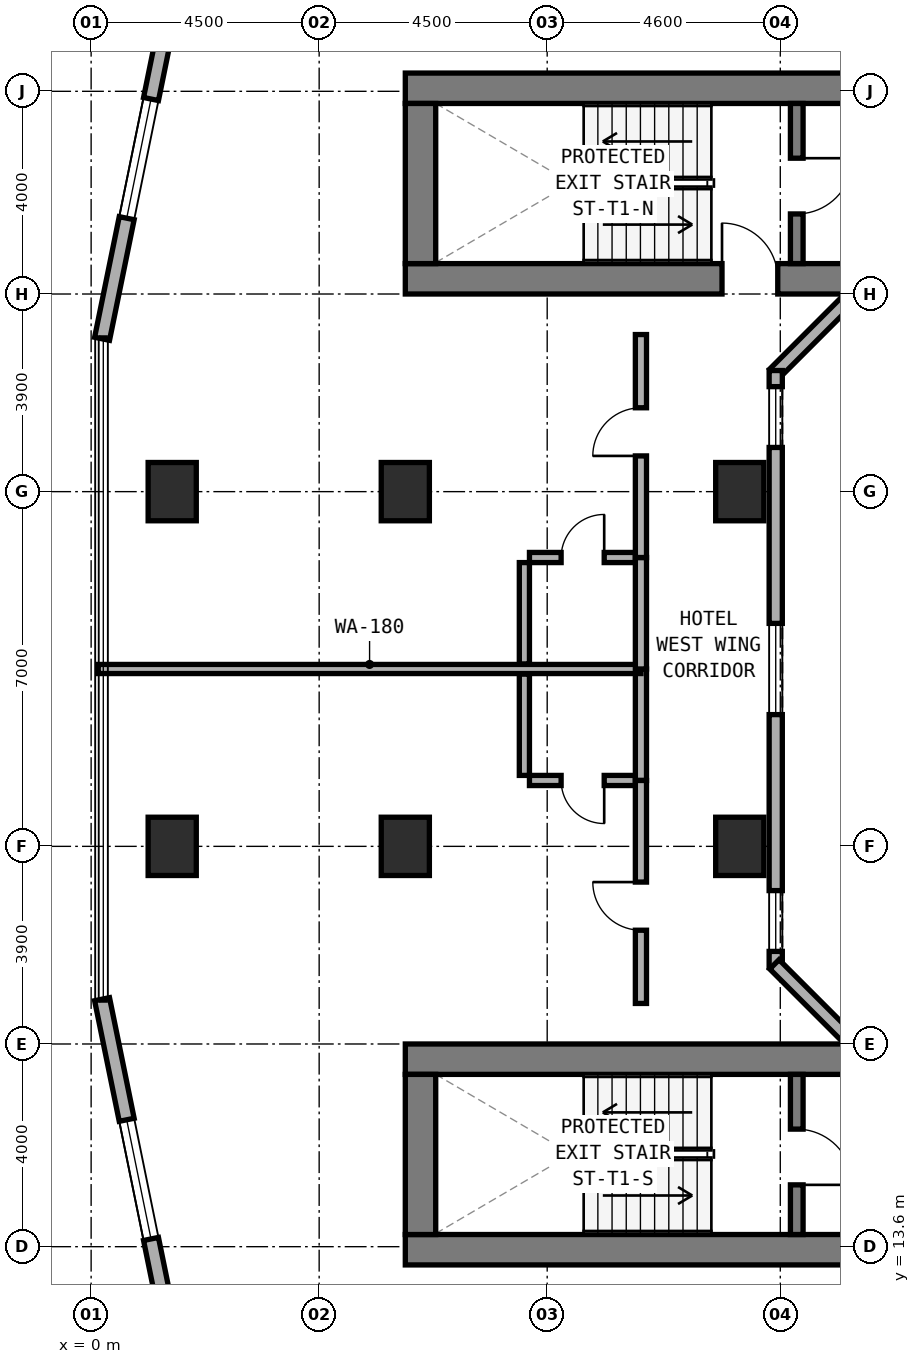
"""IFC4 building model, lengths in metres.
Left out: names, types, materials, properties, quantities, classifications, styles, units other than length and angle.
Written with IfcOpenShell. Run it as: python <this file> out.ifc"""

import sys

from ifc_helpers import new_model, si_unit, direction, frame, frame_2d, origin, origin_2d, place, context, subcontext, project, spatial, rectangle, extrude, element, fill, save


model = new_model("IFC4")
c1 = context("Model", 3, precision=1e-05, world=origin(), true_north=direction((0.0, 1.0)))
c2 = subcontext(c1, "Body", "Model", "MODEL_VIEW")
j1 = project(units=[si_unit("LENGTHUNIT", "METRE"), si_unit("PLANEANGLEUNIT", "RADIAN")], contexts=[c1])
p1 = place(None, origin())
s1 = spatial("IfcSite", under=j1, at=p1, CompositionType="ELEMENT")
p2 = place(p1, origin())
s2 = spatial("IfcBuilding", under=s1, at=p2, CompositionType="ELEMENT")
p3 = place(p2, frame((0.0, 0.0, 31.0)))
s3 = spatial("IfcBuildingStorey", under=s2, at=p3, CompositionType="ELEMENT", Elevation=31.0)
p4 = place(p3, frame((6.2, 32.7, 0.0), z_axis=(0.0, 0.0, 1.0), x_axis=(1.0, 0.0, 0.0)))
e1 = element("IfcWall", 1, at=p4, inside=s3, PredefinedType="SHEAR", context=c2, shape_type="SweptSolid", body=[
    extrude(rectangle(XDim=24.8, YDim=0.6, at=frame_2d((12.4, 0.0))), origin(), (0.0, 0.0, 1.0), 3.5),
])
p5 = place(p4, frame((6.25, 0.0, 0.0)))
e2 = element("IfcOpeningElement", 2, at=p5, cuts=e1, PredefinedType="OPENING", context=c2, shape_type="SweptSolid", body=[
    extrude(rectangle(XDim=1.1, YDim=2.15, at=frame_2d((0.55, 1.075))), frame((0.0, 0.31, 0.0), z_axis=(0.0, -1.0, 0.0), x_axis=(1.0, 0.0, 0.0)), (0.0, 0.0, 1.0), 0.62),
])
p6 = place(p3, frame((6.2, 36.46, 0.0), z_axis=(0.0, 0.0, 1.0), x_axis=(1.0, 0.0, 0.0)))
e3 = element("IfcWall", 3, at=p6, inside=s3, PredefinedType="SHEAR", context=c2, shape_type="SweptSolid", body=[
    extrude(rectangle(XDim=24.8, YDim=0.6, at=frame_2d((12.4, 0.0))), origin(), (0.0, 0.0, 1.0), 3.5),
])
p7 = place(p6, frame((9.35, 0.0, 0.0)))
e4 = element("IfcOpeningElement", 4, at=p7, cuts=e3, PredefinedType="OPENING", context=c2, shape_type="SweptSolid", body=[
    extrude(rectangle(XDim=1.2, YDim=2.15, at=frame_2d((0.6, 1.075))), frame((0.0, 0.31, 0.0), z_axis=(0.0, -1.0, 0.0), x_axis=(1.0, 0.0, 0.0)), (0.0, 0.0, 1.0), 0.62),
])
p8 = place(p6, frame((17.14, 0.0, 0.0)))
e5 = element("IfcOpeningElement", 5, at=p8, cuts=e3, PredefinedType="OPENING", context=c2, shape_type="SweptSolid", body=[
    extrude(rectangle(XDim=0.85, YDim=2.1, at=frame_2d((0.425, 1.05))), frame((0.0, 0.31, 0.0), z_axis=(0.0, -1.0, 0.0), x_axis=(1.0, 0.0, 0.0)), (0.0, 0.0, 1.0), 0.62),
])
p9 = place(p6, frame((18.983, 0.0, 0.0)))
e6 = element("IfcOpeningElement", 6, at=p9, cuts=e3, PredefinedType="OPENING", context=c2, shape_type="SweptSolid", body=[
    extrude(rectangle(XDim=1.1, YDim=2.15, at=frame_2d((0.55, 1.075))), frame((0.0, 0.31, 0.0), z_axis=(0.0, -1.0, 0.0), x_axis=(1.0, 0.0, 0.0)), (0.0, 0.0, 1.0), 0.62),
])
p10 = place(p6, frame((20.85, 0.0, 0.0)))
e7 = element("IfcOpeningElement", 7, at=p10, cuts=e3, PredefinedType="OPENING", context=c2, shape_type="SweptSolid", body=[
    extrude(rectangle(XDim=1.1, YDim=2.15, at=frame_2d((0.55, 1.075))), frame((0.0, 0.31, 0.0), z_axis=(0.0, -1.0, 0.0), x_axis=(1.0, 0.0, 0.0)), (0.0, 0.0, 1.0), 0.62),
])
p11 = place(p6, frame((22.716, 0.0, 0.0)))
e8 = element("IfcOpeningElement", 8, at=p11, cuts=e3, PredefinedType="OPENING", context=c2, shape_type="SweptSolid", body=[
    extrude(rectangle(XDim=1.1, YDim=2.15, at=frame_2d((0.55, 1.075))), frame((0.0, 0.31, 0.0), z_axis=(0.0, -1.0, 0.0), x_axis=(1.0, 0.0, 0.0)), (0.0, 0.0, 1.0), 0.62),
])
p12 = place(p3, frame((6.5, 33.0, 0.0), z_axis=(0.0, 0.0, 1.0), x_axis=(0.0, 1.0, 0.0)))
e9 = element("IfcWall", 9, at=p12, inside=s3, PredefinedType="SHEAR", context=c2, shape_type="SweptSolid", body=[
    extrude(rectangle(XDim=3.16, YDim=0.6, at=frame_2d((1.58, 0.0))), origin(), (0.0, 0.0, 1.0), 3.5),
])
p13 = place(p3, frame((13.925, 33.0, 0.0), z_axis=(0.0, 0.0, 1.0), x_axis=(0.0, 1.0, 0.0)))
e10 = element("IfcWall", 10, at=p13, inside=s3, PredefinedType="STANDARD", context=c2, shape_type="SweptSolid", body=[
    extrude(rectangle(XDim=3.16, YDim=0.25, at=frame_2d((1.58, 0.0))), origin(), (0.0, 0.0, 1.0), 3.22),
])
p14 = place(p13, frame((0.98, 0.0, 0.0)))
e11 = element("IfcOpeningElement", 11, at=p14, cuts=e10, PredefinedType="OPENING", context=c2, shape_type="SweptSolid", body=[
    extrude(rectangle(XDim=1.1, YDim=2.15, at=frame_2d((0.55, 1.075))), frame((0.0, 0.135, 0.0), z_axis=(0.0, -1.0, 0.0), x_axis=(1.0, 0.0, 0.0)), (0.0, 0.0, 1.0), 0.27),
])
p15 = place(p3, frame((6.2, 13.54, 0.0), z_axis=(0.0, 0.0, 1.0), x_axis=(1.0, 0.0, 0.0)))
e12 = element("IfcWall", 12, at=p15, inside=s3, PredefinedType="SHEAR", context=c2, shape_type="SweptSolid", body=[
    extrude(rectangle(XDim=24.8, YDim=0.6, at=frame_2d((12.4, 0.0))), origin(), (0.0, 0.0, 1.0), 3.5),
])
p16 = place(p15, frame((9.35, 0.0, 0.0)))
e13 = element("IfcOpeningElement", 13, at=p16, cuts=e12, PredefinedType="OPENING", context=c2, shape_type="SweptSolid", body=[
    extrude(rectangle(XDim=1.2, YDim=2.15, at=frame_2d((0.6, 1.075))), frame((0.0, 0.31, 0.0), z_axis=(0.0, -1.0, 0.0), x_axis=(1.0, 0.0, 0.0)), (0.0, 0.0, 1.0), 0.62),
])
p17 = place(p15, frame((17.14, 0.0, 0.0)))
e14 = element("IfcOpeningElement", 14, at=p17, cuts=e12, PredefinedType="OPENING", context=c2, shape_type="SweptSolid", body=[
    extrude(rectangle(XDim=0.85, YDim=2.1, at=frame_2d((0.425, 1.05))), frame((0.0, 0.31, 0.0), z_axis=(0.0, -1.0, 0.0), x_axis=(1.0, 0.0, 0.0)), (0.0, 0.0, 1.0), 0.62),
])
p18 = place(p3, frame((6.2, 17.3, 0.0), z_axis=(0.0, 0.0, 1.0), x_axis=(1.0, 0.0, 0.0)))
e15 = element("IfcWall", 15, at=p18, inside=s3, PredefinedType="SHEAR", context=c2, shape_type="SweptSolid", body=[
    extrude(rectangle(XDim=24.8, YDim=0.6, at=frame_2d((12.4, 0.0))), origin(), (0.0, 0.0, 1.0), 3.5),
])
p19 = place(p3, frame((6.5, 13.84, 0.0), z_axis=(0.0, 0.0, 1.0), x_axis=(0.0, 1.0, 0.0)))
e16 = element("IfcWall", 16, at=p19, inside=s3, PredefinedType="SHEAR", context=c2, shape_type="SweptSolid", body=[
    extrude(rectangle(XDim=3.16, YDim=0.6, at=frame_2d((1.58, 0.0))), origin(), (0.0, 0.0, 1.0), 3.5),
])
p20 = place(p3, frame((13.925, 13.84, 0.0), z_axis=(0.0, 0.0, 1.0), x_axis=(0.0, 1.0, 0.0)))
e17 = element("IfcWall", 17, at=p20, inside=s3, PredefinedType="STANDARD", context=c2, shape_type="SweptSolid", body=[
    extrude(rectangle(XDim=3.16, YDim=0.25, at=frame_2d((1.58, 0.0))), origin(), (0.0, 0.0, 1.0), 3.22),
])
p21 = place(p20, frame((0.98, 0.0, 0.0)))
e18 = element("IfcOpeningElement", 18, at=p21, cuts=e17, PredefinedType="OPENING", context=c2, shape_type="SweptSolid", body=[
    extrude(rectangle(XDim=1.1, YDim=2.15, at=frame_2d((0.55, 1.075))), frame((0.0, 0.135, 0.0), z_axis=(0.0, -1.0, 0.0), x_axis=(1.0, 0.0, 0.0)), (0.0, 0.0, 1.0), 0.27),
])
for number, where, z_axis, x_axis in (
    (19, (6.2, 21.5, 0.0), (0.0, 0.0, 1.0), (1.0, 0.0, 0.0)),
    (20, (6.2, 28.5, 0.0), (0.0, 0.0, 1.0), (1.0, 0.0, 0.0)),
    (21, (12.8, 21.5, 0.0), (0.0, 0.0, 1.0), (1.0, 0.0, 0.0)),
    (22, (12.8, 28.5, 0.0), (0.0, 0.0, 1.0), (1.0, 0.0, 0.0)),
    (23, (1.6, 21.5, 0.0), (0.0, 0.0, 1.0), (1.0, 0.0, 0.0)),
    (24, (1.6, 28.5, 0.0), (0.0, 0.0, 1.0), (1.0, 0.0, 0.0)),
):
    element("IfcColumn", number, at=place(p3, frame(where, z_axis=z_axis, x_axis=x_axis)), inside=s3, PredefinedType="COLUMN", context=c2, shape_type="SweptSolid", body=[
        extrude(rectangle(XDim=0.95, YDim=1.15, at=origin_2d()), origin(), (0.0, 0.0, 1.0), 3.5),
    ])
p22 = place(p3, frame((2.229, 41.378, 0.0), z_axis=(0.0, 0.0, 1.0), x_axis=(-0.199990901713, -0.979797754249, 0.0)))
e25 = element("IfcWall", 25, at=p22, inside=s3, PredefinedType="STANDARD", context=c2, shape_type="SweptSolid", body=[
    extrude(rectangle(XDim=10.065, YDim=0.3, at=frame_2d((5.033, 0.0))), origin(), (0.0, 0.0, 1.0), 3.22),
])
p23 = place(p22, frame((0.378, 0.0, 0.85)))
e26 = element("IfcOpeningElement", 26, at=p23, cuts=e25, PredefinedType="OPENING", context=c2, shape_type="SweptSolid", body=[
    extrude(rectangle(XDim=1.8, YDim=1.5, at=frame_2d((0.9, 0.75))), frame((0.0, 0.16, 0.0), z_axis=(0.0, -1.0, 0.0), x_axis=(1.0, 0.0, 0.0)), (0.0, 0.0, 1.0), 0.32),
])
p24 = place(p22, frame((5.236, 0.0, 0.8)))
e27 = element("IfcOpeningElement", 27, at=p24, cuts=e25, PredefinedType="OPENING", context=c2, shape_type="SweptSolid", body=[
    extrude(rectangle(XDim=2.4, YDim=1.6, at=frame_2d((1.2, 0.8))), frame((0.0, 0.16, 0.0), z_axis=(0.0, -1.0, 0.0), x_axis=(1.0, 0.0, 0.0)), (0.0, 0.0, 1.0), 0.32),
])
p25 = place(p3, frame((0.216, 18.484, 0.0), z_axis=(0.0, 0.0, 1.0), x_axis=(0.199990901713, -0.979797754249, 0.0)))
e28 = element("IfcWall", 28, at=p25, inside=s3, PredefinedType="STANDARD", context=c2, shape_type="SweptSolid", body=[
    extrude(rectangle(XDim=10.065, YDim=0.3, at=frame_2d((5.033, 0.0))), origin(), (0.0, 0.0, 1.0), 3.22),
])
p26 = place(p25, frame((2.429, 0.0, 0.8)))
e29 = element("IfcOpeningElement", 29, at=p26, cuts=e28, PredefinedType="OPENING", context=c2, shape_type="SweptSolid", body=[
    extrude(rectangle(XDim=2.4, YDim=1.6, at=frame_2d((1.2, 0.8))), frame((0.0, 0.16, 0.0), z_axis=(0.0, -1.0, 0.0), x_axis=(1.0, 0.0, 0.0)), (0.0, 0.0, 1.0), 0.32),
])
p27 = place(p25, frame((7.887, 0.0, 0.85)))
e30 = element("IfcOpeningElement", 30, at=p27, cuts=e28, PredefinedType="OPENING", context=c2, shape_type="SweptSolid", body=[
    extrude(rectangle(XDim=1.8, YDim=1.5, at=frame_2d((0.9, 0.75))), frame((0.0, 0.16, 0.0), z_axis=(0.0, -1.0, 0.0), x_axis=(1.0, 0.0, 0.0)), (0.0, 0.0, 1.0), 0.32),
])
p28 = place(p3, frame((15.318, 32.662, 0.0), z_axis=(0.0, 0.0, 1.0), x_axis=(-0.707106781187, -0.707106781187, 0.0)))
e31 = element("IfcWall", 31, at=p28, inside=s3, PredefinedType="STANDARD", context=c2, shape_type="SweptSolid", body=[
    extrude(rectangle(XDim=2.594, YDim=0.26, at=frame_2d((1.297, 0.0))), origin(), (0.0, 0.0, 1.0), 3.22),
])
p29 = place(p3, frame((13.51, 30.89, 0.0), z_axis=(0.0, 0.0, 1.0), x_axis=(0.0, -1.0, 0.0)))
e32 = element("IfcWall", 32, at=p29, inside=s3, PredefinedType="STANDARD", context=c2, shape_type="SweptSolid", body=[
    extrude(rectangle(XDim=11.78, YDim=0.26, at=frame_2d((5.89, 0.0))), origin(), (0.0, 0.0, 1.0), 3.22),
])
p30 = place(p29, frame((0.318, 0.0, 0.85)))
e33 = element("IfcOpeningElement", 33, at=p30, cuts=e32, PredefinedType="OPENING", context=c2, shape_type="SweptSolid", body=[
    extrude(rectangle(XDim=1.2, YDim=1.5, at=frame_2d((0.6, 0.75))), frame((0.0, 0.14, 0.0), z_axis=(0.0, -1.0, 0.0), x_axis=(1.0, 0.0, 0.0)), (0.0, 0.0, 1.0), 0.28),
])
p31 = place(p29, frame((4.99, 0.0, 0.85)))
e34 = element("IfcOpeningElement", 34, at=p31, cuts=e32, PredefinedType="OPENING", context=c2, shape_type="SweptSolid", body=[
    extrude(rectangle(XDim=1.8, YDim=1.5, at=frame_2d((0.9, 0.75))), frame((0.0, 0.14, 0.0), z_axis=(0.0, -1.0, 0.0), x_axis=(1.0, 0.0, 0.0)), (0.0, 0.0, 1.0), 0.28),
])
p32 = place(p29, frame((10.263, 0.0, 0.85)))
e35 = element("IfcOpeningElement", 35, at=p32, cuts=e32, PredefinedType="OPENING", context=c2, shape_type="SweptSolid", body=[
    extrude(rectangle(XDim=1.2, YDim=1.5, at=frame_2d((0.6, 0.75))), frame((0.0, 0.14, 0.0), z_axis=(0.0, -1.0, 0.0), x_axis=(1.0, 0.0, 0.0)), (0.0, 0.0, 1.0), 0.28),
])
p33 = place(p3, frame((13.484, 19.172, 0.0), z_axis=(0.0, 0.0, 1.0), x_axis=(0.707106781187, -0.707106781187, 0.0)))
e36 = element("IfcWall", 36, at=p33, inside=s3, PredefinedType="STANDARD", context=c2, shape_type="SweptSolid", body=[
    extrude(rectangle(XDim=2.594, YDim=0.26, at=frame_2d((1.297, 0.0))), origin(), (0.0, 0.0, 1.0), 3.22),
])
p34 = place(p3, frame((8.65, 22.8, 0.0), z_axis=(0.0, 0.0, 1.0), x_axis=(1.0, 0.0, 0.0)))
e37 = element("IfcWall", 37, at=p34, inside=s3, PredefinedType="PLUMBINGWALL", context=c2, shape_type="SweptSolid", body=[
    extrude(rectangle(XDim=2.1, YDim=0.2, at=frame_2d((1.05, 0.0))), origin(), (0.0, 0.0, 1.0), 3.22),
])
p35 = place(p34, frame((0.625, 0.0, 0.0)))
e38 = element("IfcOpeningElement", 38, at=p35, cuts=e37, PredefinedType="OPENING", context=c2, shape_type="SweptSolid", body=[
    extrude(rectangle(XDim=0.85, YDim=2.1, at=frame_2d((0.425, 1.05))), frame((0.0, 0.11, 0.0), z_axis=(0.0, -1.0, 0.0), x_axis=(1.0, 0.0, 0.0)), (0.0, 0.0, 1.0), 0.22),
])
p36 = place(p3, frame((8.55, 22.9, 0.0), z_axis=(0.0, 0.0, 1.0), x_axis=(0.0, 1.0, 0.0)))
e39 = element("IfcWall", 39, at=p36, inside=s3, PredefinedType="PLUMBINGWALL", context=c2, shape_type="SweptSolid", body=[
    extrude(rectangle(XDim=2.0, YDim=0.2, at=frame_2d((1.0, 0.0))), origin(), (0.0, 0.0, 1.0), 3.22),
])
p37 = place(p3, frame((10.85, 22.8, 0.0), z_axis=(0.0, 0.0, 1.0), x_axis=(0.0, 1.0, 0.0)))
e40 = element("IfcWall", 40, at=p37, inside=s3, PredefinedType="SOLIDWALL", context=c2, shape_type="SweptSolid", body=[
    extrude(rectangle(XDim=2.2, YDim=0.22, at=frame_2d((1.1, 0.0))), origin(), (0.0, 0.0, 1.0), 3.22),
])
p38 = place(p3, frame((10.85, 18.4, 0.0), z_axis=(0.0, 0.0, 1.0), x_axis=(0.0, 1.0, 0.0)))
e41 = element("IfcWall", 41, at=p38, inside=s3, PredefinedType="SOLIDWALL", context=c2, shape_type="SweptSolid", body=[
    extrude(rectangle(XDim=4.4, YDim=0.22, at=frame_2d((2.2, 0.0))), origin(), (0.0, 0.0, 1.0), 2.395),
])
p39 = place(p38, frame((1.445, 0.0, 0.0)))
e42 = element("IfcOpeningElement", 42, at=p39, cuts=e41, PredefinedType="OPENING", context=c2, shape_type="SweptSolid", body=[
    extrude(rectangle(XDim=0.95, YDim=2.1, at=frame_2d((0.475, 1.05))), frame((0.0, 0.12, 0.0), z_axis=(0.0, -1.0, 0.0), x_axis=(1.0, 0.0, 0.0)), (0.0, 0.0, 1.0), 0.24),
])
p40 = place(p3, frame((0.14, 25.0, 0.0), z_axis=(0.0, 0.0, 1.0), x_axis=(1.0, 0.0, 0.0)))
e43 = element("IfcWall", 43, at=p40, inside=s3, PredefinedType="SOLIDWALL", context=c2, shape_type="SweptSolid", body=[
    extrude(rectangle(XDim=10.71, YDim=0.18, at=frame_2d((5.355, 0.0))), origin(), (0.0, 0.0, 1.0), 2.745),
])
p41 = place(p3, frame((8.65, 27.2, 0.0), z_axis=(0.0, 0.0, 1.0), x_axis=(1.0, 0.0, 0.0)))
e44 = element("IfcWall", 44, at=p41, inside=s3, PredefinedType="PLUMBINGWALL", context=c2, shape_type="SweptSolid", body=[
    extrude(rectangle(XDim=2.1, YDim=0.2, at=frame_2d((1.05, 0.0))), origin(), (0.0, 0.0, 1.0), 3.22),
])
p42 = place(p41, frame((0.625, 0.0, 0.0)))
e45 = element("IfcOpeningElement", 45, at=p42, cuts=e44, PredefinedType="OPENING", context=c2, shape_type="SweptSolid", body=[
    extrude(rectangle(XDim=0.85, YDim=2.1, at=frame_2d((0.425, 1.05))), frame((0.0, 0.11, 0.0), z_axis=(0.0, -1.0, 0.0), x_axis=(1.0, 0.0, 0.0)), (0.0, 0.0, 1.0), 0.22),
])
p43 = place(p3, frame((8.55, 25.1, 0.0), z_axis=(0.0, 0.0, 1.0), x_axis=(0.0, 1.0, 0.0)))
e46 = element("IfcWall", 46, at=p43, inside=s3, PredefinedType="PLUMBINGWALL", context=c2, shape_type="SweptSolid", body=[
    extrude(rectangle(XDim=2.0, YDim=0.2, at=frame_2d((1.0, 0.0))), origin(), (0.0, 0.0, 1.0), 3.22),
])
p44 = place(p3, frame((10.85, 25.0, 0.0), z_axis=(0.0, 0.0, 1.0), x_axis=(0.0, 1.0, 0.0)))
e47 = element("IfcWall", 47, at=p44, inside=s3, PredefinedType="SOLIDWALL", context=c2, shape_type="SweptSolid", body=[
    extrude(rectangle(XDim=2.2, YDim=0.22, at=frame_2d((1.1, 0.0))), origin(), (0.0, 0.0, 1.0), 3.22),
])
p45 = place(p3, frame((10.85, 27.2, 0.0), z_axis=(0.0, 0.0, 1.0), x_axis=(0.0, 1.0, 0.0)))
e48 = element("IfcWall", 48, at=p45, inside=s3, PredefinedType="SOLIDWALL", context=c2, shape_type="SweptSolid", body=[
    extrude(rectangle(XDim=4.4, YDim=0.22, at=frame_2d((2.2, 0.0))), origin(), (0.0, 0.0, 1.0), 2.395),
])
p46 = place(p45, frame((2.005, 0.0, 0.0)))
e49 = element("IfcOpeningElement", 49, at=p46, cuts=e48, PredefinedType="OPENING", context=c2, shape_type="SweptSolid", body=[
    extrude(rectangle(XDim=0.95, YDim=2.1, at=frame_2d((0.475, 1.05))), frame((0.0, 0.12, 0.0), z_axis=(0.0, -1.0, 0.0), x_axis=(1.0, 0.0, 0.0)), (0.0, 0.0, 1.0), 0.24),
])
p47 = place(p24, origin())
e50 = element("IfcWindow", 50, at=p47, inside=s3, PartitioningType="SINGLE_PANEL", PredefinedType="WINDOW", context=c2, shape_type="SweptSolid", body=[
    extrude(rectangle(XDim=2.4, YDim=1.6, at=frame_2d((1.2, 0.8))), frame((0.0, 0.03, 0.0), z_axis=(0.0, -1.0, 0.0), x_axis=(1.0, 0.0, 0.0)), (0.0, 0.0, 1.0), 0.06),
])
fill(e27, e50)
p48 = place(p26, origin())
e51 = element("IfcWindow", 51, at=p48, inside=s3, PartitioningType="SINGLE_PANEL", PredefinedType="WINDOW", context=c2, shape_type="SweptSolid", body=[
    extrude(rectangle(XDim=2.4, YDim=1.6, at=frame_2d((1.2, 0.8))), frame((0.0, 0.03, 0.0), z_axis=(0.0, -1.0, 0.0), x_axis=(1.0, 0.0, 0.0)), (0.0, 0.0, 1.0), 0.06),
])
fill(e29, e51)
p49 = place(p30, origin())
e52 = element("IfcWindow", 52, at=p49, inside=s3, PartitioningType="SINGLE_PANEL", PredefinedType="WINDOW", context=c2, shape_type="SweptSolid", body=[
    extrude(rectangle(XDim=1.2, YDim=1.5, at=frame_2d((0.6, 0.75))), frame((0.0, 0.03, 0.0), z_axis=(0.0, -1.0, 0.0), x_axis=(1.0, 0.0, 0.0)), (0.0, 0.0, 1.0), 0.06),
])
fill(e33, e52)
p50 = place(p31, origin())
e53 = element("IfcWindow", 53, at=p50, inside=s3, PartitioningType="SINGLE_PANEL", PredefinedType="WINDOW", context=c2, shape_type="SweptSolid", body=[
    extrude(rectangle(XDim=1.8, YDim=1.5, at=frame_2d((0.9, 0.75))), frame((0.0, 0.03, 0.0), z_axis=(0.0, -1.0, 0.0), x_axis=(1.0, 0.0, 0.0)), (0.0, 0.0, 1.0), 0.06),
])
fill(e34, e53)
p51 = place(p32, origin())
e54 = element("IfcWindow", 54, at=p51, inside=s3, PartitioningType="SINGLE_PANEL", PredefinedType="WINDOW", context=c2, shape_type="SweptSolid", body=[
    extrude(rectangle(XDim=1.2, YDim=1.5, at=frame_2d((0.6, 0.75))), frame((0.0, 0.03, 0.0), z_axis=(0.0, -1.0, 0.0), x_axis=(1.0, 0.0, 0.0)), (0.0, 0.0, 1.0), 0.06),
])
fill(e35, e54)
p52 = place(p14, frame((1.1, 0.0, 0.0), z_axis=(0.0, 0.0, 1.0), x_axis=(-1.0, 0.0, 0.0)))
e55 = element("IfcDoor", 55, at=p52, inside=s3, OperationType="SINGLE_SWING_LEFT", PredefinedType="DOOR", context=c2, shape_type="SweptSolid", body=[
    extrude(rectangle(XDim=1.1, YDim=2.15, at=frame_2d((0.55, 1.075))), frame((0.0, 0.025, 0.0), z_axis=(0.0, -1.0, 0.0), x_axis=(1.0, 0.0, 0.0)), (0.0, 0.0, 1.0), 0.05),
])
fill(e11, e55)
p53 = place(p21, frame((1.1, 0.0, 0.0), z_axis=(0.0, 0.0, 1.0), x_axis=(-1.0, 0.0, 0.0)))
e56 = element("IfcDoor", 56, at=p53, inside=s3, OperationType="SINGLE_SWING_RIGHT", PredefinedType="DOOR", context=c2, shape_type="SweptSolid", body=[
    extrude(rectangle(XDim=1.1, YDim=2.15, at=frame_2d((0.55, 1.075))), frame((0.0, 0.025, 0.0), z_axis=(0.0, -1.0, 0.0), x_axis=(1.0, 0.0, 0.0)), (0.0, 0.0, 1.0), 0.05),
])
fill(e18, e56)
p54 = place(p5, origin())
e57 = element("IfcDoor", 57, at=p54, inside=s3, OperationType="SINGLE_SWING_LEFT", PredefinedType="DOOR", context=c2, shape_type="SweptSolid", body=[
    extrude(rectangle(XDim=1.1, YDim=2.15, at=frame_2d((0.55, 1.075))), frame((0.0, 0.025, 0.0), z_axis=(0.0, -1.0, 0.0), x_axis=(1.0, 0.0, 0.0)), (0.0, 0.0, 1.0), 0.05),
])
fill(e2, e57)
p55 = place(p35, frame((0.85, 0.0, 0.0), z_axis=(0.0, 0.0, 1.0), x_axis=(-1.0, 0.0, 0.0)))
e58 = element("IfcDoor", 58, at=p55, inside=s3, OperationType="SINGLE_SWING_LEFT", PredefinedType="DOOR", context=c2, shape_type="SweptSolid", body=[
    extrude(rectangle(XDim=0.85, YDim=2.1, at=frame_2d((0.425, 1.05))), frame((0.0, 0.025, 0.0), z_axis=(0.0, -1.0, 0.0), x_axis=(1.0, 0.0, 0.0)), (0.0, 0.0, 1.0), 0.05),
])
fill(e38, e58)
p56 = place(p39, origin())
e59 = element("IfcDoor", 59, at=p56, inside=s3, OperationType="SINGLE_SWING_RIGHT", PredefinedType="DOOR", context=c2, shape_type="SweptSolid", body=[
    extrude(rectangle(XDim=0.95, YDim=2.1, at=frame_2d((0.475, 1.05))), frame((0.0, 0.025, 0.0), z_axis=(0.0, -1.0, 0.0), x_axis=(1.0, 0.0, 0.0)), (0.0, 0.0, 1.0), 0.05),
])
fill(e42, e59)
p57 = place(p42, origin())
e60 = element("IfcDoor", 60, at=p57, inside=s3, OperationType="SINGLE_SWING_RIGHT", PredefinedType="DOOR", context=c2, shape_type="SweptSolid", body=[
    extrude(rectangle(XDim=0.85, YDim=2.1, at=frame_2d((0.425, 1.05))), frame((0.0, 0.025, 0.0), z_axis=(0.0, -1.0, 0.0), x_axis=(1.0, 0.0, 0.0)), (0.0, 0.0, 1.0), 0.05),
])
fill(e45, e60)
p58 = place(p46, origin())
e61 = element("IfcDoor", 61, at=p58, inside=s3, OperationType="SINGLE_SWING_LEFT", PredefinedType="DOOR", context=c2, shape_type="SweptSolid", body=[
    extrude(rectangle(XDim=0.95, YDim=2.1, at=frame_2d((0.475, 1.05))), frame((0.0, 0.025, 0.0), z_axis=(0.0, -1.0, 0.0), x_axis=(1.0, 0.0, 0.0)), (0.0, 0.0, 1.0), 0.05),
])
fill(e49, e61)
save(model, sys.argv[1])
